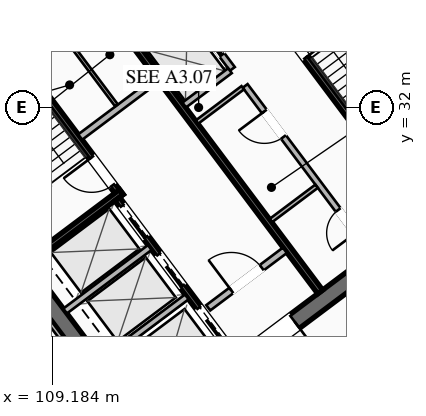
"""IFC4 building model, lengths in metres.
Left out: names, types, materials, properties, quantities, classifications, styles, units other than length and angle.
Written with IfcOpenShell. Run it as: python <this file> out.ifc"""

import sys

from ifc_helpers import new_model, si_unit, direction, frame, frame_2d, origin, place, context, subcontext, project, spatial, rectangle, extrude, element, fill, save


model = new_model("IFC4")
c1 = context("Model", 3, precision=1e-05, world=origin(), true_north=direction((0.0, 1.0)))
c2 = subcontext(c1, "Body", "Model", "MODEL_VIEW")
j1 = project(units=[si_unit("LENGTHUNIT", "METRE"), si_unit("PLANEANGLEUNIT", "RADIAN")], contexts=[c1])
p1 = place(None, origin())
s1 = spatial("IfcSite", under=j1, at=p1, CompositionType="ELEMENT")
p2 = place(p1, origin())
s2 = spatial("IfcBuilding", under=s1, at=p2, CompositionType="ELEMENT")
p3 = place(p2, frame((0.0, 0.0, 167.65)))
s3 = spatial("IfcBuildingStorey", under=s2, at=p3, CompositionType="ELEMENT", Elevation=167.65)
for number, where, z_axis, x_axis in (
    (1, (112.436, 21.077, 0.0), (0.0, 0.0, 1.0), (-0.6, 0.8, 0.0)),
    (2, (115.564, 42.923, 0.0), (0.0, 0.0, 1.0), (0.6, -0.8, 0.0)),
):
    element("IfcWall", number, at=place(p3, frame(where, z_axis=z_axis, x_axis=x_axis)), inside=s3, PredefinedType="SHEAR", context=c2, shape_type="SweptSolid", body=[
        extrude(rectangle(XDim=15.6, YDim=0.55, at=frame_2d((7.8, 0.0))), origin(), (0.0, 0.0, 1.0), 3.55),
    ])
p4 = place(p3, frame((124.539, 30.498, 0.0), z_axis=(0.0, 0.0, 1.0), x_axis=(-0.799998054672, -0.600002593761, 0.0)))
e3 = element("IfcWall", 3, at=p4, inside=s3, PredefinedType="SHEAR", context=c2, shape_type="SweptSolid", body=[
    extrude(rectangle(XDim=15.06, YDim=0.55, at=frame_2d((7.53, 0.0))), origin(), (0.0, 0.0, 1.0), 3.55),
])
p5 = place(p4, frame((9.23, 0.0, 0.0)))
e4 = element("IfcOpeningElement", 4, at=p5, cuts=e3, PredefinedType="OPENING", context=c2, shape_type="SweptSolid", body=[
    extrude(rectangle(XDim=1.25, YDim=2.25, at=frame_2d((0.625, 1.125))), frame((0.0, 0.285, 0.0), z_axis=(0.0, -1.0, 0.0), x_axis=(1.0, 0.0, 0.0)), (0.0, 0.0, 1.0), 0.57),
])
p6 = place(p4, frame((4.18, 0.0, 0.0)))
e5 = element("IfcOpeningElement", 5, at=p6, cuts=e3, PredefinedType="OPENING", context=c2, shape_type="SweptSolid", body=[
    extrude(rectangle(XDim=1.25, YDim=2.25, at=frame_2d((0.625, 1.125))), frame((0.0, 0.285, 0.0), z_axis=(0.0, -1.0, 0.0), x_axis=(1.0, 0.0, 0.0)), (0.0, 0.0, 1.0), 0.57),
])
p7 = place(p3, frame((103.461, 33.502, 0.0), z_axis=(0.0, 0.0, 1.0), x_axis=(0.799998054672, 0.600002593761, 0.0)))
e6 = element("IfcWall", 6, at=p7, inside=s3, PredefinedType="SHEAR", context=c2, shape_type="SweptSolid", body=[
    extrude(rectangle(XDim=15.06, YDim=0.55, at=frame_2d((7.53, 0.0))), origin(), (0.0, 0.0, 1.0), 3.55),
])
p8 = place(p7, frame((4.58, 0.0, 0.0)))
e7 = element("IfcOpeningElement", 7, at=p8, cuts=e6, PredefinedType="OPENING", context=c2, shape_type="SweptSolid", body=[
    extrude(rectangle(XDim=1.25, YDim=2.25, at=frame_2d((0.625, 1.125))), frame((0.0, 0.285, 0.0), z_axis=(0.0, -1.0, 0.0), x_axis=(1.0, 0.0, 0.0)), (0.0, 0.0, 1.0), 0.57),
])
p9 = place(p7, frame((9.63, 0.0, 0.0)))
e8 = element("IfcOpeningElement", 8, at=p9, cuts=e6, PredefinedType="OPENING", context=c2, shape_type="SweptSolid", body=[
    extrude(rectangle(XDim=1.25, YDim=2.25, at=frame_2d((0.625, 1.125))), frame((0.0, 0.285, 0.0), z_axis=(0.0, -1.0, 0.0), x_axis=(1.0, 0.0, 0.0)), (0.0, 0.0, 1.0), 0.57),
])
p10 = place(p3, frame((111.44, 29.08, 0.0), z_axis=(0.0, 0.0, 1.0), x_axis=(-0.59999029481, 0.8000072788, 0.0)))
e9 = element("IfcWall", 9, at=p10, inside=s3, PredefinedType="SHEAR", context=c2, shape_type="SweptSolid", body=[
    extrude(rectangle(XDim=8.05, YDim=0.2, at=frame_2d((4.025, 0.0))), origin(), (0.0, 0.0, 1.0), 3.37),
])
p11 = place(p10, frame((0.45, 0.0, 0.0)))
e10 = element("IfcOpeningElement", 10, at=p11, cuts=e9, PredefinedType="OPENING", context=c2, shape_type="SweptSolid", body=[
    extrude(rectangle(XDim=1.15, YDim=2.2, at=frame_2d((0.575, 1.1))), frame((0.0, 0.11, 0.0), z_axis=(0.0, -1.0, 0.0), x_axis=(1.0, 0.0, 0.0)), (0.0, 0.0, 1.0), 0.22),
])
p12 = place(p3, frame((108.396, 26.922, 0.0), z_axis=(0.0, 0.0, 1.0), x_axis=(0.800015298837, 0.599979601008, 0.0)))
e11 = element("IfcWall", 11, at=p12, inside=s3, PredefinedType="SHEAR", context=c2, shape_type="SweptSolid", body=[
    extrude(rectangle(XDim=3.83, YDim=0.2, at=frame_2d((1.915, 0.0))), origin(), (0.0, 0.0, 1.0), 3.37),
])
p13 = place(p3, frame((116.56, 34.92, 0.0), z_axis=(0.0, 0.0, 1.0), x_axis=(0.59999029481, -0.8000072788, 0.0)))
e12 = element("IfcWall", 12, at=p13, inside=s3, PredefinedType="SHEAR", context=c2, shape_type="SweptSolid", body=[
    extrude(rectangle(XDim=8.05, YDim=0.2, at=frame_2d((4.025, 0.0))), origin(), (0.0, 0.0, 1.0), 3.37),
])
p14 = place(p13, frame((0.45, 0.0, 0.0)))
e13 = element("IfcOpeningElement", 13, at=p14, cuts=e12, PredefinedType="OPENING", context=c2, shape_type="SweptSolid", body=[
    extrude(rectangle(XDim=1.15, YDim=2.2, at=frame_2d((0.575, 1.1))), frame((0.0, 0.11, 0.0), z_axis=(0.0, -1.0, 0.0), x_axis=(1.0, 0.0, 0.0)), (0.0, 0.0, 1.0), 0.22),
])
p15 = place(p3, frame((117.998, 25.936, 0.0), z_axis=(0.0, 0.0, 1.0), x_axis=(-0.600002693989, 0.799997979501, 0.0)))
e14 = element("IfcWall", 14, at=p15, inside=s3, PredefinedType="SHEAR", context=c2, shape_type="SweptSolid", body=[
    extrude(rectangle(XDim=14.5, YDim=0.2, at=frame_2d((7.25, 0.0))), origin(), (0.0, 0.0, 1.0), 3.37),
])
p16 = place(p3, frame((110.104, 31.028, 0.0), z_axis=(0.0, 0.0, 1.0), x_axis=(0.800018601094, 0.59997519774, 0.0)))
e15 = element("IfcWall", 15, at=p16, inside=s3, PredefinedType="SOLIDWALL", context=c2, shape_type="SweptSolid", body=[
    extrude(rectangle(XDim=3.15, YDim=0.22, at=frame_2d((1.575, 0.0))), origin(), (0.0, 0.0, 1.0), 2.723),
])
p17 = place(p3, frame((114.316, 25.412, 0.0), z_axis=(0.0, 0.0, 1.0), x_axis=(0.800018601094, 0.59997519774, 0.0)))
e16 = element("IfcWall", 16, at=p17, inside=s3, PredefinedType="SOLIDWALL", context=c2, shape_type="SweptSolid", body=[
    extrude(rectangle(XDim=3.15, YDim=0.22, at=frame_2d((1.575, 0.0))), origin(), (0.0, 0.0, 1.0), 2.723),
])
p18 = place(p17, frame((0.95, 0.0, 0.0)))
e17 = element("IfcOpeningElement", 17, at=p18, cuts=e16, PredefinedType="OPENING", context=c2, shape_type="SweptSolid", body=[
    extrude(rectangle(XDim=1.25, YDim=2.25, at=frame_2d((0.625, 1.125))), frame((0.0, 0.12, 0.0), z_axis=(0.0, -1.0, 0.0), x_axis=(1.0, 0.0, 0.0)), (0.0, 0.0, 1.0), 0.24),
])
p19 = place(p3, frame((115.19, 23.83, 0.0), z_axis=(0.0, 0.0, 1.0), x_axis=(-0.599993943644, 0.800004542231, 0.0)))
e18 = element("IfcWall", 18, at=p19, inside=s3, PredefinedType="SHEAR", context=c2, shape_type="SweptSolid", body=[
    extrude(rectangle(XDim=6.45, YDim=0.2, at=frame_2d((3.225, 0.0))), origin(), (0.0, 0.0, 1.0), 3.37),
])
p20 = place(p19, frame((4.875, 0.0, 0.0)))
e19 = element("IfcOpeningElement", 19, at=p20, cuts=e18, PredefinedType="OPENING", context=c2, shape_type="SweptSolid", body=[
    extrude(rectangle(XDim=1.3, YDim=2.25, at=frame_2d((0.65, 1.125))), frame((0.0, 0.11, 0.0), z_axis=(0.0, -1.0, 0.0), x_axis=(1.0, 0.0, 0.0)), (0.0, 0.0, 1.0), 0.22),
])
p21 = place(p19, frame((2.875, 0.0, 0.0)))
e20 = element("IfcOpeningElement", 20, at=p21, cuts=e18, PredefinedType="OPENING", context=c2, shape_type="SweptSolid", body=[
    extrude(rectangle(XDim=1.3, YDim=2.25, at=frame_2d((0.65, 1.125))), frame((0.0, 0.11, 0.0), z_axis=(0.0, -1.0, 0.0), x_axis=(1.0, 0.0, 0.0)), (0.0, 0.0, 1.0), 0.22),
])
p22 = place(p19, frame((0.675, 0.0, 0.0)))
e21 = element("IfcOpeningElement", 21, at=p22, cuts=e18, PredefinedType="OPENING", context=c2, shape_type="SweptSolid", body=[
    extrude(rectangle(XDim=1.3, YDim=2.25, at=frame_2d((0.65, 1.125))), frame((0.0, 0.11, 0.0), z_axis=(0.0, -1.0, 0.0), x_axis=(1.0, 0.0, 0.0)), (0.0, 0.0, 1.0), 0.22),
])
for number, where, z_axis, x_axis in (
    (22, (110.826, 23.682, 0.0), (0.0, 0.0, 1.0), (0.8, 0.6, 0.0)),
    (23, (109.608, 25.306, 0.0), (0.0, 0.0, 1.0), (0.8, 0.6, 0.0)),
):
    element("IfcWall", number, at=place(p3, frame(where, z_axis=z_axis, x_axis=x_axis)), inside=s3, PredefinedType="SOLIDWALL", context=c2, shape_type="SweptSolid", body=[
        extrude(rectangle(XDim=3.48, YDim=0.2, at=frame_2d((1.74, 0.0))), origin(), (0.0, 0.0, 1.0), 3.37),
    ])
p23 = place(p3, frame((111.296, 32.072, 0.0), z_axis=(0.0, 0.0, 1.0), x_axis=(-0.59995887973, 0.800030838552, 0.0)))
e24 = element("IfcWall", 24, at=p23, inside=s3, PredefinedType="PARTITIONING", context=c2, shape_type="SweptSolid", body=[
    extrude(rectangle(XDim=3.8, YDim=0.11, at=frame_2d((1.9, 0.0))), origin(), (0.0, 0.0, 1.0), 2.723),
])
p24 = place(p3, frame((119.67, 27.19, 0.0), z_axis=(0.0, 0.0, 1.0), x_axis=(-0.599988677396, 0.800008491828, 0.0)))
e25 = element("IfcWall", 25, at=p24, inside=s3, PredefinedType="SOLIDWALL", context=c2, shape_type="SweptSolid", body=[
    extrude(rectangle(XDim=6.9, YDim=0.2, at=frame_2d((3.45, 0.0))), origin(), (0.0, 0.0, 1.0), 2.723),
])
p25 = place(p24, frame((0.85, 0.0, 0.0)))
e26 = element("IfcOpeningElement", 26, at=p25, cuts=e25, PredefinedType="OPENING", context=c2, shape_type="SweptSolid", body=[
    extrude(rectangle(XDim=0.95, YDim=2.05, at=frame_2d((0.475, 1.025))), frame((0.0, 0.11, 0.0), z_axis=(0.0, -1.0, 0.0), x_axis=(1.0, 0.0, 0.0)), (0.0, 0.0, 1.0), 0.22),
])
p26 = place(p24, frame((4.8, 0.0, 0.0)))
e27 = element("IfcOpeningElement", 27, at=p26, cuts=e25, PredefinedType="OPENING", context=c2, shape_type="SweptSolid", body=[
    extrude(rectangle(XDim=1.05, YDim=2.2, at=frame_2d((0.525, 1.1))), frame((0.0, 0.11, 0.0), z_axis=(0.0, -1.0, 0.0), x_axis=(1.0, 0.0, 0.0)), (0.0, 0.0, 1.0), 0.22),
])
for number, where, z_axis, x_axis in (
    (28, (113.946, 31.522, 0.0), (0.0, 0.0, 1.0), (0.8, 0.6, 0.0)),
    (29, (116.376, 28.282, 0.0), (0.0, 0.0, 1.0), (0.8, 0.6, 0.0)),
):
    element("IfcWall", number, at=place(p3, frame(where, z_axis=z_axis, x_axis=x_axis)), inside=s3, PredefinedType="PARTITIONING", context=c2, shape_type="SweptSolid", body=[
        extrude(rectangle(XDim=1.88, YDim=0.135, at=frame_2d((0.94, 0.0))), origin(), (0.0, 0.0, 1.0), 2.723),
    ])
p27 = place(p3, frame((115.11, 33.27, 0.0), z_axis=(0.0, 0.0, 1.0), x_axis=(-0.600011322243, 0.799991508192, 0.0)))
e30 = element("IfcWall", 30, at=p27, inside=s3, PredefinedType="SOLIDWALL", context=c2, shape_type="SweptSolid", body=[
    extrude(rectangle(XDim=6.9, YDim=0.2, at=frame_2d((3.45, 0.0))), origin(), (0.0, 0.0, 1.0), 3.37),
])
p28 = place(p27, frame((0.575, 0.0, 0.0)))
e31 = element("IfcOpeningElement", 31, at=p28, cuts=e30, PredefinedType="OPENING", context=c2, shape_type="SweptSolid", body=[
    extrude(rectangle(XDim=1.1, YDim=2.2, at=frame_2d((0.55, 1.1))), frame((0.0, 0.11, 0.0), z_axis=(0.0, -1.0, 0.0), x_axis=(1.0, 0.0, 0.0)), (0.0, 0.0, 1.0), 0.22),
])
p29 = place(p27, frame((2.825, 0.0, 0.0)))
e32 = element("IfcOpeningElement", 32, at=p29, cuts=e30, PredefinedType="OPENING", context=c2, shape_type="SweptSolid", body=[
    extrude(rectangle(XDim=1.1, YDim=2.2, at=frame_2d((0.55, 1.1))), frame((0.0, 0.11, 0.0), z_axis=(0.0, -1.0, 0.0), x_axis=(1.0, 0.0, 0.0)), (0.0, 0.0, 1.0), 0.22),
])
p30 = place(p27, frame((5.075, 0.0, 0.0)))
e33 = element("IfcOpeningElement", 33, at=p30, cuts=e30, PredefinedType="OPENING", context=c2, shape_type="SweptSolid", body=[
    extrude(rectangle(XDim=1.1, YDim=2.2, at=frame_2d((0.55, 1.1))), frame((0.0, 0.11, 0.0), z_axis=(0.0, -1.0, 0.0), x_axis=(1.0, 0.0, 0.0)), (0.0, 0.0, 1.0), 0.22),
])
p31 = place(p3, frame((113.526, 32.082, 0.0), z_axis=(0.0, 0.0, 1.0), x_axis=(0.800046745961, 0.599937666993, 0.0)))
e34 = element("IfcWall", 34, at=p31, inside=s3, PredefinedType="SOLIDWALL", context=c2, shape_type="SweptSolid", body=[
    extrude(rectangle(XDim=1.88, YDim=0.2, at=frame_2d((0.94, 0.0))), origin(), (0.0, 0.0, 1.0), 3.37),
])
p32 = place(p3, frame((112.176, 33.882, 0.0), z_axis=(0.0, 0.0, 1.0), x_axis=(0.8, 0.6, 0.0)))
e35 = element("IfcWall", 35, at=p32, inside=s3, PredefinedType="SOLIDWALL", context=c2, shape_type="SweptSolid", body=[
    extrude(rectangle(XDim=1.88, YDim=0.2, at=frame_2d((0.94, 0.0))), origin(), (0.0, 0.0, 1.0), 3.37),
])
p33 = place(p3, frame((96.748, 31.086, 0.0), z_axis=(0.0, 0.0, 1.0), x_axis=(0.8, 0.6, 0.0)))
e36 = element("IfcWall", 36, at=p33, inside=s3, PredefinedType="PARTITIONING", context=c2, shape_type="SweptSolid", body=[
    extrude(rectangle(XDim=28.7, YDim=0.135, at=frame_2d((14.35, 0.0))), origin(), (0.0, 0.0, 1.0), 2.723),
])
p34 = place(p33, frame((0.3, 0.0, 0.0)))
e37 = element("IfcOpeningElement", 37, at=p34, cuts=e36, PredefinedType="OPENING", context=c2, shape_type="SweptSolid", body=[
    extrude(rectangle(XDim=0.95, YDim=2.05, at=frame_2d((0.475, 1.025))), frame((0.0, 0.077, 0.0), z_axis=(0.0, -1.0, 0.0), x_axis=(1.0, 0.0, 0.0)), (0.0, 0.0, 1.0), 0.155),
])
p35 = place(p33, frame((13.999, 0.0, 0.0)))
e38 = element("IfcOpeningElement", 38, at=p35, cuts=e36, PredefinedType="OPENING", context=c2, shape_type="SweptSolid", body=[
    extrude(rectangle(XDim=0.95, YDim=2.05, at=frame_2d((0.475, 1.025))), frame((0.0, 0.077, 0.0), z_axis=(0.0, -1.0, 0.0), x_axis=(1.0, 0.0, 0.0)), (0.0, 0.0, 1.0), 0.155),
])
p36 = place(p33, frame((27.45, 0.0, 0.0)))
e39 = element("IfcOpeningElement", 39, at=p36, cuts=e36, PredefinedType="OPENING", context=c2, shape_type="SweptSolid", body=[
    extrude(rectangle(XDim=0.95, YDim=2.05, at=frame_2d((0.475, 1.025))), frame((0.0, 0.077, 0.0), z_axis=(0.0, -1.0, 0.0), x_axis=(1.0, 0.0, 0.0)), (0.0, 0.0, 1.0), 0.155),
])
p37 = place(p3, frame((132.23, 31.61, 0.0), z_axis=(0.0, 0.0, 1.0), x_axis=(-0.799995916807, -0.600005444218, 0.0)))
e40 = element("IfcWall", 40, at=p37, inside=s3, PredefinedType="PARTITIONING", context=c2, shape_type="SweptSolid", body=[
    extrude(rectangle(XDim=28.7, YDim=0.135, at=frame_2d((14.35, 0.0))), origin(), (0.0, 0.0, 1.0), 2.723),
])
p38 = place(p37, frame((27.37, 0.0, 0.0)))
e41 = element("IfcOpeningElement", 41, at=p38, cuts=e40, PredefinedType="OPENING", context=c2, shape_type="SweptSolid", body=[
    extrude(rectangle(XDim=0.95, YDim=2.05, at=frame_2d((0.475, 1.025))), frame((0.0, 0.077, 0.0), z_axis=(0.0, -1.0, 0.0), x_axis=(1.0, 0.0, 0.0)), (0.0, 0.0, 1.0), 0.155),
])
p39 = place(p37, frame((13.775, 0.0, 0.0)))
e42 = element("IfcOpeningElement", 42, at=p39, cuts=e40, PredefinedType="OPENING", context=c2, shape_type="SweptSolid", body=[
    extrude(rectangle(XDim=0.95, YDim=2.05, at=frame_2d((0.475, 1.025))), frame((0.0, 0.077, 0.0), z_axis=(0.0, -1.0, 0.0), x_axis=(1.0, 0.0, 0.0)), (0.0, 0.0, 1.0), 0.155),
])
p40 = place(p37, frame((0.38, 0.0, 0.0)))
e43 = element("IfcOpeningElement", 43, at=p40, cuts=e40, PredefinedType="OPENING", context=c2, shape_type="SweptSolid", body=[
    extrude(rectangle(XDim=0.95, YDim=2.05, at=frame_2d((0.475, 1.025))), frame((0.0, 0.077, 0.0), z_axis=(0.0, -1.0, 0.0), x_axis=(1.0, 0.0, 0.0)), (0.0, 0.0, 1.0), 0.155),
])
p41 = place(p3, frame((112.104, 20.928, 0.0), z_axis=(0.0, 0.0, 1.0), x_axis=(-0.599994940075, 0.800003794918, 0.0)))
e44 = element("IfcWall", 44, at=p41, inside=s3, PredefinedType="PARTITIONING", context=c2, shape_type="SweptSolid", body=[
    extrude(rectangle(XDim=15.44, YDim=0.135, at=frame_2d((7.72, 0.0))), origin(), (0.0, 0.0, 1.0), 2.723),
])
p42 = place(p5, origin())
e45 = element("IfcDoor", 45, at=p42, inside=s3, OperationType="SINGLE_SWING_LEFT", PredefinedType="DOOR", context=c2, shape_type="SweptSolid", body=[
    extrude(rectangle(XDim=1.25, YDim=2.25, at=frame_2d((0.625, 1.125))), frame((0.0, 0.025, 0.0), z_axis=(0.0, -1.0, 0.0), x_axis=(1.0, 0.0, 0.0)), (0.0, 0.0, 1.0), 0.05),
])
fill(e4, e45)
p43 = place(p11, origin())
e46 = element("IfcDoor", 46, at=p43, inside=s3, OperationType="SINGLE_SWING_RIGHT", PredefinedType="DOOR", context=c2, shape_type="SweptSolid", body=[
    extrude(rectangle(XDim=1.15, YDim=2.2, at=frame_2d((0.575, 1.1))), frame((0.0, 0.025, 0.0), z_axis=(0.0, -1.0, 0.0), x_axis=(1.0, 0.0, 0.0)), (0.0, 0.0, 1.0), 0.05),
])
fill(e10, e46)
p44 = place(p14, origin())
e47 = element("IfcDoor", 47, at=p44, inside=s3, OperationType="SINGLE_SWING_RIGHT", PredefinedType="DOOR", context=c2, shape_type="SweptSolid", body=[
    extrude(rectangle(XDim=1.15, YDim=2.2, at=frame_2d((0.575, 1.1))), frame((0.0, 0.025, 0.0), z_axis=(0.0, -1.0, 0.0), x_axis=(1.0, 0.0, 0.0)), (0.0, 0.0, 1.0), 0.05),
])
fill(e13, e47)
p45 = place(p18, origin())
e48 = element("IfcDoor", 48, at=p45, inside=s3, OperationType="SINGLE_SWING_LEFT", PredefinedType="DOOR", context=c2, shape_type="SweptSolid", body=[
    extrude(rectangle(XDim=1.25, YDim=2.25, at=frame_2d((0.625, 1.125))), frame((0.0, 0.025, 0.0), z_axis=(0.0, -1.0, 0.0), x_axis=(1.0, 0.0, 0.0)), (0.0, 0.0, 1.0), 0.05),
])
fill(e17, e48)
p46 = place(p25, origin())
e49 = element("IfcDoor", 49, at=p46, inside=s3, OperationType="SINGLE_SWING_LEFT", PredefinedType="DOOR", context=c2, shape_type="SweptSolid", body=[
    extrude(rectangle(XDim=0.95, YDim=2.05, at=frame_2d((0.475, 1.025))), frame((0.0, 0.025, 0.0), z_axis=(0.0, -1.0, 0.0), x_axis=(1.0, 0.0, 0.0)), (0.0, 0.0, 1.0), 0.05),
])
fill(e26, e49)
p47 = place(p26, origin())
e50 = element("IfcDoor", 50, at=p47, inside=s3, OperationType="SINGLE_SWING_RIGHT", PredefinedType="DOOR", context=c2, shape_type="SweptSolid", body=[
    extrude(rectangle(XDim=1.05, YDim=2.2, at=frame_2d((0.525, 1.1))), frame((0.0, 0.025, 0.0), z_axis=(0.0, -1.0, 0.0), x_axis=(1.0, 0.0, 0.0)), (0.0, 0.0, 1.0), 0.05),
])
fill(e27, e50)
p48 = place(p20, origin())
e51 = element("IfcDoor", 51, at=p48, inside=s3, OperationType="SLIDING_TO_LEFT", PredefinedType="DOOR", context=c2, shape_type="SweptSolid", body=[
    extrude(rectangle(XDim=1.3, YDim=2.25, at=frame_2d((0.65, 1.125))), frame((0.0, 0.025, 0.0), z_axis=(0.0, -1.0, 0.0), x_axis=(1.0, 0.0, 0.0)), (0.0, 0.0, 1.0), 0.05),
])
fill(e19, e51)
p49 = place(p21, origin())
e52 = element("IfcDoor", 52, at=p49, inside=s3, OperationType="SLIDING_TO_LEFT", PredefinedType="DOOR", context=c2, shape_type="SweptSolid", body=[
    extrude(rectangle(XDim=1.3, YDim=2.25, at=frame_2d((0.65, 1.125))), frame((0.0, 0.025, 0.0), z_axis=(0.0, -1.0, 0.0), x_axis=(1.0, 0.0, 0.0)), (0.0, 0.0, 1.0), 0.05),
])
fill(e20, e52)
p50 = place(p22, origin())
e53 = element("IfcDoor", 53, at=p50, inside=s3, OperationType="SLIDING_TO_LEFT", PredefinedType="DOOR", context=c2, shape_type="SweptSolid", body=[
    extrude(rectangle(XDim=1.3, YDim=2.25, at=frame_2d((0.65, 1.125))), frame((0.0, 0.025, 0.0), z_axis=(0.0, -1.0, 0.0), x_axis=(1.0, 0.0, 0.0)), (0.0, 0.0, 1.0), 0.05),
])
fill(e21, e53)
p51 = place(p28, origin())
e54 = element("IfcDoor", 54, at=p51, inside=s3, OperationType="SLIDING_TO_LEFT", PredefinedType="DOOR", context=c2, shape_type="SweptSolid", body=[
    extrude(rectangle(XDim=1.1, YDim=2.2, at=frame_2d((0.55, 1.1))), frame((0.0, 0.025, 0.0), z_axis=(0.0, -1.0, 0.0), x_axis=(1.0, 0.0, 0.0)), (0.0, 0.0, 1.0), 0.05),
])
fill(e31, e54)
save(model, sys.argv[1])
